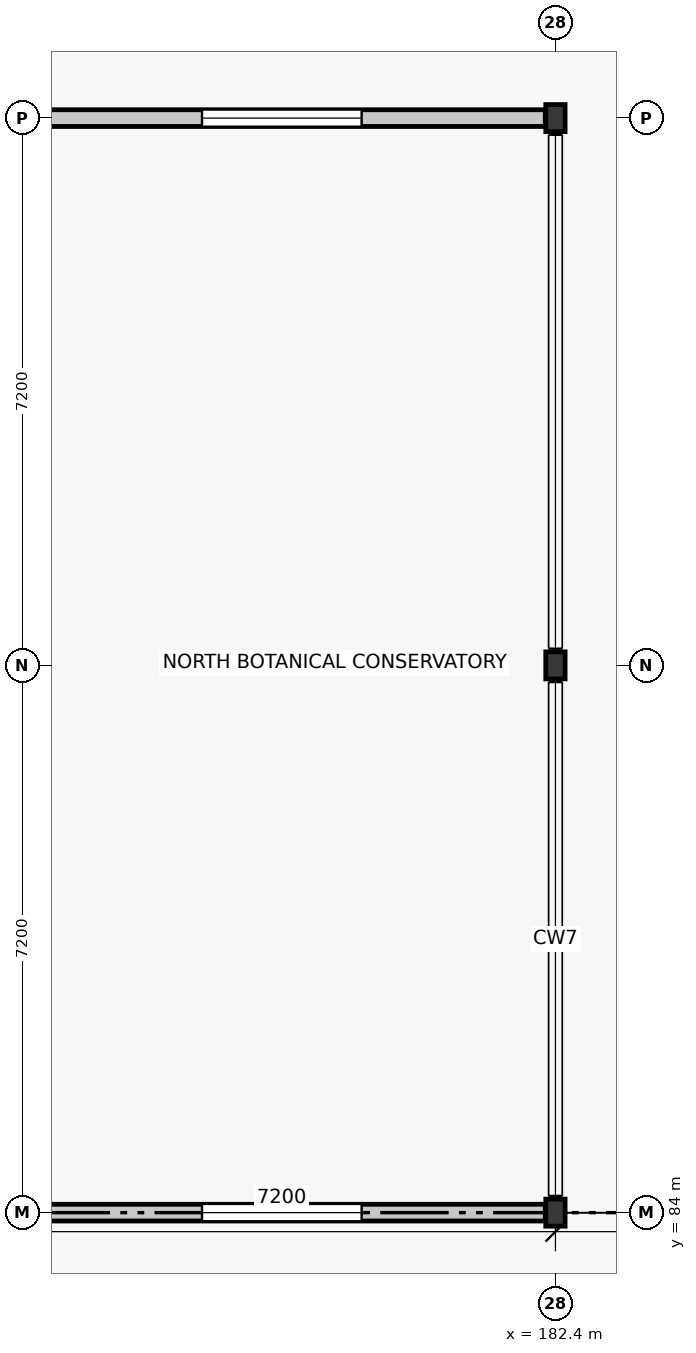
"""IFC4 building model, lengths in metres.
Left out: names, types, materials, properties, quantities, classifications, styles, units other than length and angle.
Written with IfcOpenShell. Run it as: python <this file> out.ifc"""

import sys

from ifc_helpers import new_model, si_unit, direction, frame, frame_2d, origin, origin_2d, place, context, subcontext, project, spatial, rectangle, i_section, extrude, element, fill, save


model = new_model("IFC4")
c1 = context("Model", 3, precision=1e-05, world=origin(), true_north=direction((0.0, 1.0)))
c2 = subcontext(c1, "Body", "Model", "MODEL_VIEW")
j1 = project(units=[si_unit("LENGTHUNIT", "METRE"), si_unit("PLANEANGLEUNIT", "RADIAN")], contexts=[c1])
p1 = place(None, origin())
s1 = spatial("IfcSite", under=j1, at=p1, CompositionType="ELEMENT")
p2 = place(p1, origin())
s2 = spatial("IfcBuilding", under=s1, at=p2, CompositionType="ELEMENT")
p3 = place(p2, frame((0.0, 0.0, 13.2)))
s3 = spatial("IfcBuildingStorey", under=s2, at=p3, CompositionType="ELEMENT", Elevation=13.2)
for number, where, z_axis, x_axis in (
    (1, (182.4, 84.0, 0.0), (0.0, 0.0, 1.0), (1.0, 0.0, 0.0)),
    (2, (182.4, 91.2, 0.0), (0.0, 0.0, 1.0), (1.0, 0.0, 0.0)),
    (3, (182.4, 98.4, 0.0), (0.0, 0.0, 1.0), (1.0, 0.0, 0.0)),
):
    element("IfcColumn", number, at=place(p3, frame(where, z_axis=z_axis, x_axis=x_axis)), inside=s3, PredefinedType="COLUMN", context=c2, shape_type="SweptSolid", body=[
        extrude(i_section(OverallWidth=0.254, OverallDepth=0.356, WebThickness=0.01, FlangeThickness=0.018, FilletRadius=0.015, at=origin_2d()), origin(), (0.0, 0.0, 1.0), 3.66),
    ])
p4 = place(p3, frame((182.266, 84.0, 0.0), z_axis=(0.0, 0.0, 1.0), x_axis=(-1.0, 0.0, 0.0)))
e4 = element("IfcWall", 4, at=p4, inside=s3, PredefinedType="STANDARD", context=c2, shape_type="SweptSolid", body=[
    extrude(rectangle(XDim=6.932, YDim=0.22, at=frame_2d((3.466, 0.0))), origin(), (0.0, 0.0, 1.0), 3.19),
])
p5 = place(p4, frame((2.416, 0.0, 0.95)))
e5 = element("IfcOpeningElement", 5, at=p5, cuts=e4, PredefinedType="OPENING", context=c2, shape_type="SweptSolid", body=[
    extrude(rectangle(XDim=2.1, YDim=1.5, at=frame_2d((1.05, 0.75))), frame((0.0, 0.12, 0.0), z_axis=(0.0, -1.0, 0.0), x_axis=(1.0, 0.0, 0.0)), (0.0, 0.0, 1.0), 0.24),
])
p6 = place(p3, frame((175.334, 98.4, 0.0), z_axis=(0.0, 0.0, 1.0), x_axis=(1.0, 0.0, 0.0)))
e6 = element("IfcWall", 6, at=p6, inside=s3, PredefinedType="STANDARD", context=c2, shape_type="SweptSolid", body=[
    extrude(rectangle(XDim=6.932, YDim=0.22, at=frame_2d((3.466, 0.0))), origin(), (0.0, 0.0, 1.0), 3.19),
])
p7 = place(p6, frame((2.416, 0.0, 0.95)))
e7 = element("IfcOpeningElement", 7, at=p7, cuts=e6, PredefinedType="OPENING", context=c2, shape_type="SweptSolid", body=[
    extrude(rectangle(XDim=2.1, YDim=1.5, at=frame_2d((1.05, 0.75))), frame((0.0, 0.12, 0.0), z_axis=(0.0, -1.0, 0.0), x_axis=(1.0, 0.0, 0.0)), (0.0, 0.0, 1.0), 0.24),
])
p8 = place(p5, origin())
e8 = element("IfcWindow", 8, at=p8, inside=s3, PartitioningType="SINGLE_PANEL", PredefinedType="WINDOW", context=c2, shape_type="SweptSolid", body=[
    extrude(rectangle(XDim=2.1, YDim=1.5, at=frame_2d((1.05, 0.75))), frame((0.0, 0.03, 0.0), z_axis=(0.0, -1.0, 0.0), x_axis=(1.0, 0.0, 0.0)), (0.0, 0.0, 1.0), 0.06),
])
fill(e5, e8)
p9 = place(p7, origin())
e9 = element("IfcWindow", 9, at=p9, inside=s3, PartitioningType="SINGLE_PANEL", PredefinedType="WINDOW", context=c2, shape_type="SweptSolid", body=[
    extrude(rectangle(XDim=2.1, YDim=1.5, at=frame_2d((1.05, 0.75))), frame((0.0, 0.03, 0.0), z_axis=(0.0, -1.0, 0.0), x_axis=(1.0, 0.0, 0.0)), (0.0, 0.0, 1.0), 0.06),
])
fill(e7, e9)
save(model, sys.argv[1])
